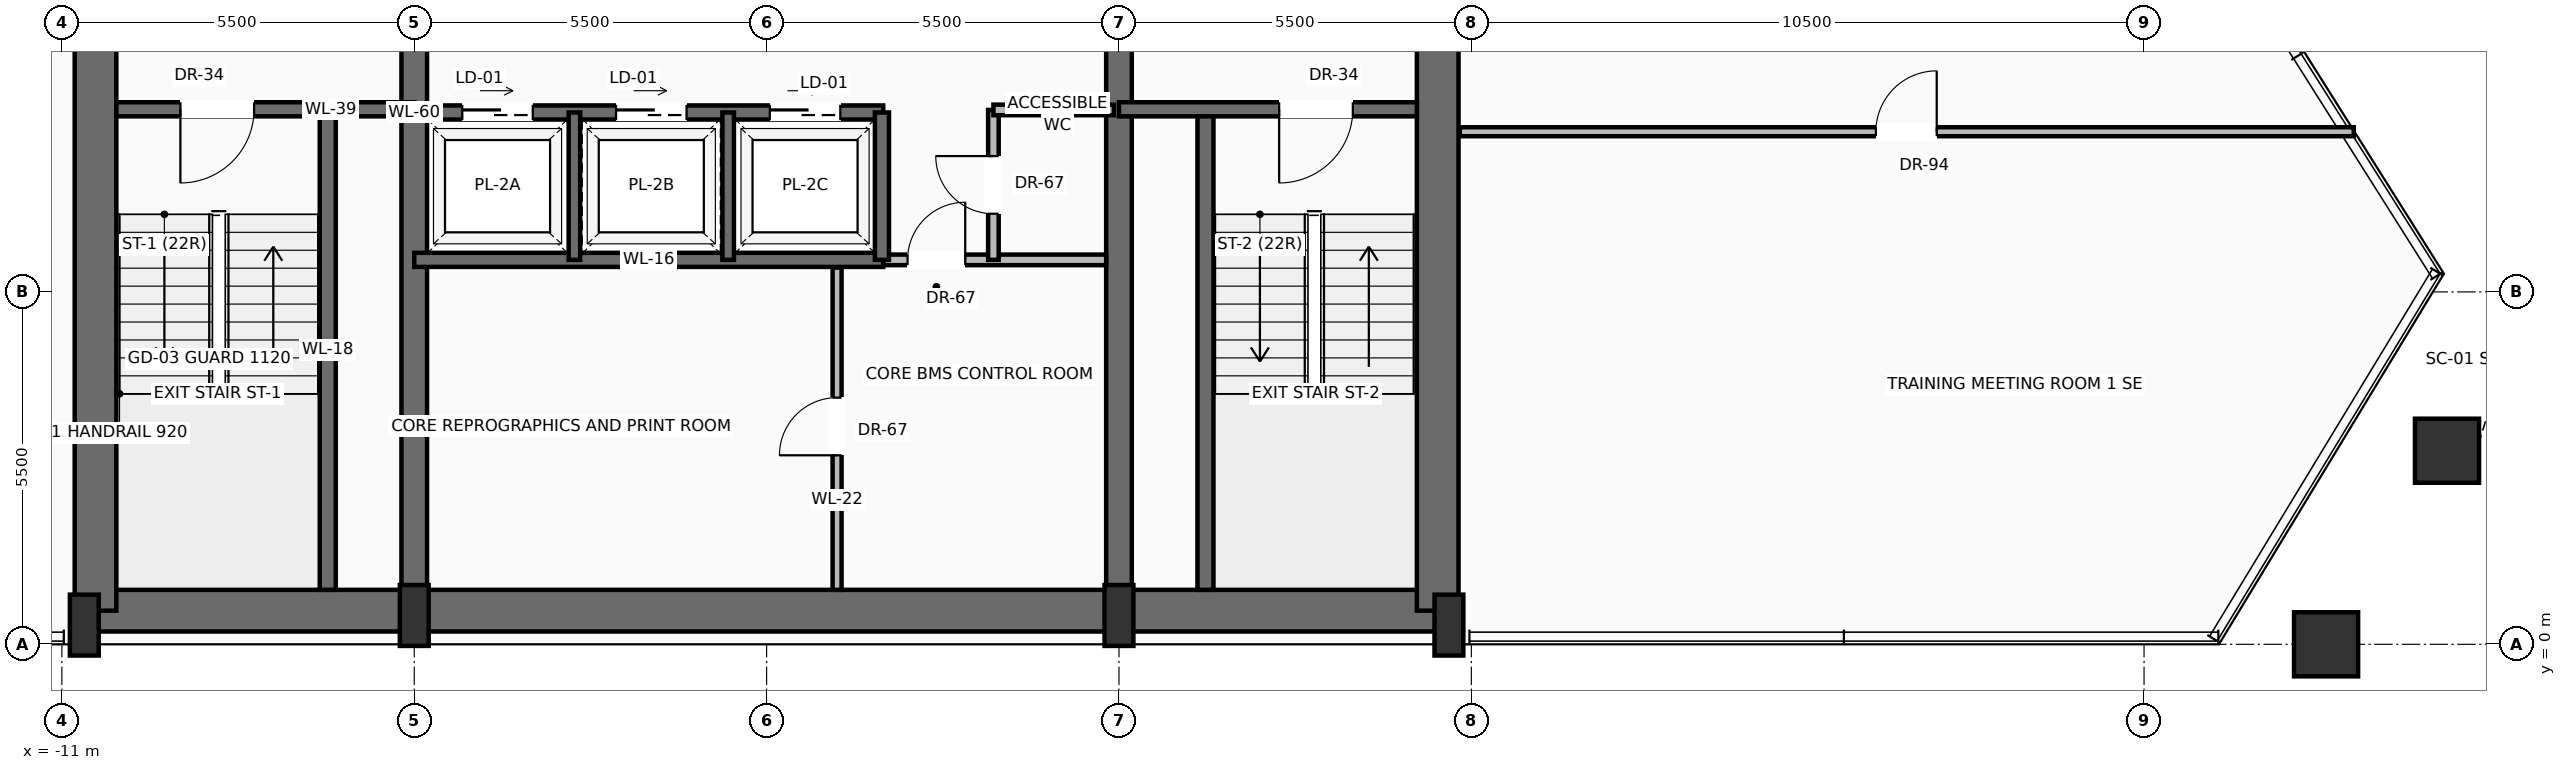
"""IFC4 building model, lengths in metres.
Left out: names, types, materials, properties, quantities, classifications, styles, units other than length and angle.
Written with IfcOpenShell. Run it as: python <this file> out.ifc"""

import sys

from ifc_helpers import new_model, si_unit, direction, frame, frame_2d, origin, origin_2d, place, context, subcontext, project, spatial, rectangle, hollow_rectangle, extrude, source, transform, mapped, element, fill, save


model = new_model("IFC4")
c1 = context("Model", 3, precision=1e-05, world=origin(), true_north=direction((0.0, 1.0)))
c2 = subcontext(c1, "Body", "Model", "MODEL_VIEW")
j1 = project(units=[si_unit("LENGTHUNIT", "METRE"), si_unit("PLANEANGLEUNIT", "RADIAN")], contexts=[c1])
p1 = place(None, origin())
s1 = spatial("IfcSite", under=j1, at=p1, CompositionType="ELEMENT")
p2 = place(p1, origin())
s2 = spatial("IfcBuilding", under=s1, at=p2, CompositionType="ELEMENT")
p3 = place(p2, frame((0.0, 0.0, 208.0)))
s3 = spatial("IfcBuildingStorey", under=s2, at=p3, CompositionType="ELEMENT", Elevation=208.0)
p4 = place(p3, frame((-10.65, 0.525, 0.0), z_axis=(0.0, 0.0, 1.0), x_axis=(1.0, 0.0, 0.0)))
e1 = element("IfcWall", 1, at=p4, inside=s3, PredefinedType="SHEAR", context=c2, shape_type="SweptSolid", body=[
    extrude(rectangle(XDim=21.3, YDim=0.65, at=frame_2d((10.65, 0.0))), origin(), (0.0, 0.0, 1.0), 3.47),
])
for number, where, z_axis, x_axis in (
    (2, (-10.475, 0.525, 0.0), (0.0, 0.0, 1.0), (0.0, 1.0, 0.0)),
    (3, (10.475, 0.525, 0.0), (0.0, 0.0, 1.0), (0.0, 1.0, 0.0)),
):
    element("IfcWall", number, at=place(p3, frame(where, z_axis=z_axis, x_axis=x_axis)), inside=s3, PredefinedType="SHEAR", context=c2, shape_type="SweptSolid", body=[
        extrude(rectangle(XDim=15.55, YDim=0.65, at=frame_2d((7.775, 0.0))), origin(), (0.0, 0.0, 1.0), 3.47),
    ])
p5 = place(p3, frame((-5.5, 0.525, 0.0), z_axis=(0.0, 0.0, 1.0), x_axis=(0.0, 1.0, 0.0)))
e4 = element("IfcWall", 4, at=p5, inside=s3, PredefinedType="SHEAR", context=c2, shape_type="SweptSolid", body=[
    extrude(rectangle(XDim=15.55, YDim=0.4, at=frame_2d((7.775, 0.0))), origin(), (0.0, 0.0, 1.0), 3.47),
])
p6 = place(p5, frame((8.975, 0.0, 0.0)))
e5 = element("IfcOpeningElement", 5, at=p6, cuts=e4, PredefinedType="OPENING", context=c2, shape_type="SweptSolid", body=[
    extrude(rectangle(XDim=1.1, YDim=2.2, at=frame_2d((0.55, 1.1))), frame((0.0, 0.21, 0.0), z_axis=(0.0, -1.0, 0.0), x_axis=(1.0, 0.0, 0.0)), (0.0, 0.0, 1.0), 0.42),
])
p7 = place(p3, frame((5.5, 0.525, 0.0), z_axis=(0.0, 0.0, 1.0), x_axis=(0.0, 1.0, 0.0)))
e6 = element("IfcWall", 6, at=p7, inside=s3, PredefinedType="SHEAR", context=c2, shape_type="SweptSolid", body=[
    extrude(rectangle(XDim=15.55, YDim=0.4, at=frame_2d((7.775, 0.0))), origin(), (0.0, 0.0, 1.0), 3.47),
])
p8 = place(p7, frame((8.975, 0.0, 0.0)))
e7 = element("IfcOpeningElement", 7, at=p8, cuts=e6, PredefinedType="OPENING", context=c2, shape_type="SweptSolid", body=[
    extrude(rectangle(XDim=1.1, YDim=2.2, at=frame_2d((0.55, 1.1))), frame((0.0, 0.21, 0.0), z_axis=(0.0, -1.0, 0.0), x_axis=(1.0, 0.0, 0.0)), (0.0, 0.0, 1.0), 0.42),
])
m1 = source(origin(), c2, "Body", "SweptSolid", [
    extrude(rectangle(XDim=0.45, YDim=0.95, at=origin_2d()), origin(), (0.0, 0.0, 1.0), 3.7),
])
for number, where, z_axis, x_axis in (
    (8, (-10.65, 0.3, 0.0), (0.0, 0.0, 1.0), (1.0, 0.0, 0.0)),
    (9, (-5.5, 0.45, 0.0), (0.0, 0.0, 1.0), (1.0, 0.0, 0.0)),
    (10, (5.5, 0.45, 0.0), (0.0, 0.0, 1.0), (1.0, 0.0, 0.0)),
    (11, (10.65, 0.3, 0.0), (0.0, 0.0, 1.0), (1.0, 0.0, 0.0)),
):
    element("IfcColumn", number, at=place(p3, frame(where, z_axis=z_axis, x_axis=x_axis)), inside=s3, PredefinedType="PILASTER", context=c2, shape_type="MappedRepresentation", body=[
        mapped(m1, transform((0.0, 0.0, 0.0), scale=1.0)),
    ])
m2 = source(origin(), c2, "Body", "SweptSolid", [
    extrude(hollow_rectangle(XDim=1.0, YDim=1.0, WallThickness=0.05, at=origin_2d()), origin(), (0.0, 0.0, 1.0), 3.691),
])
p9 = place(p3, frame((24.341, 0.0, 0.004), z_axis=(0.004365326486, 0.0, 0.999990471917), x_axis=(0.0, 1.0, 0.0)))
e12 = element("IfcColumn", 12, at=p9, inside=s3, PredefinedType="COLUMN", context=c2, shape_type="MappedRepresentation", body=[
    mapped(m2, transform((0.0, 0.0, 0.0), scale=1.0)),
])
m3 = source(origin(), c2, "Body", "SweptSolid", [
    extrude(hollow_rectangle(XDim=1.0, YDim=1.0, WallThickness=0.05, at=origin_2d()), origin(), (0.0, 0.0, 1.0), 3.692),
])
p10 = place(p3, frame((26.229, 3.021, 0.004), z_axis=(-0.00800175362, -0.017061590362, 0.99982242127), x_axis=(0.905374629778, -0.424613682958, 0.0)))
e13 = element("IfcColumn", 13, at=p10, inside=s3, PredefinedType="COLUMN", context=c2, shape_type="MappedRepresentation", body=[
    mapped(m3, transform((0.0, 0.0, 0.0), scale=1.0)),
])
p11 = place(p3, frame((-6.85, 0.85, 0.0), z_axis=(0.0, 0.0, 1.0), x_axis=(0.0, 1.0, 0.0)))
e14 = element("IfcWall", 14, at=p11, inside=s3, PredefinedType="SOLIDWALL", context=c2, shape_type="SweptSolid", body=[
    extrude(rectangle(XDim=7.5, YDim=0.25, at=frame_2d((3.75, 0.0))), origin(), (0.0, 0.0, 1.0), 3.47),
])
p12 = place(p3, frame((-5.5, 8.35, 0.0), z_axis=(0.0, 0.0, 1.0), x_axis=(-1.0, 0.0, 0.0)))
e15 = element("IfcWall", 15, at=p12, inside=s3, PredefinedType="SOLIDWALL", context=c2, shape_type="SweptSolid", body=[
    extrude(rectangle(XDim=4.65, YDim=0.22, at=frame_2d((2.325, 0.0))), origin(), (0.0, 0.0, 1.0), 3.47),
])
p13 = place(p12, frame((2.5, 0.0, 0.0)))
e16 = element("IfcOpeningElement", 16, at=p13, cuts=e15, PredefinedType="OPENING", context=c2, shape_type="SweptSolid", body=[
    extrude(rectangle(XDim=1.15, YDim=2.2, at=frame_2d((0.575, 1.1))), frame((0.0, 0.12, 0.0), z_axis=(0.0, -1.0, 0.0), x_axis=(1.0, 0.0, 0.0)), (0.0, 0.0, 1.0), 0.24),
])
p14 = place(p3, frame((6.85, 0.85, 0.0), z_axis=(0.0, 0.0, 1.0), x_axis=(0.0, 1.0, 0.0)))
e17 = element("IfcWall", 17, at=p14, inside=s3, PredefinedType="SOLIDWALL", context=c2, shape_type="SweptSolid", body=[
    extrude(rectangle(XDim=7.5, YDim=0.25, at=frame_2d((3.75, 0.0))), origin(), (0.0, 0.0, 1.0), 3.47),
])
p15 = place(p3, frame((10.15, 8.35, 0.0), z_axis=(0.0, 0.0, 1.0), x_axis=(-1.0, 0.0, 0.0)))
e18 = element("IfcWall", 18, at=p15, inside=s3, PredefinedType="SOLIDWALL", context=c2, shape_type="SweptSolid", body=[
    extrude(rectangle(XDim=4.65, YDim=0.22, at=frame_2d((2.325, 0.0))), origin(), (0.0, 0.0, 1.0), 3.47),
])
p16 = place(p15, frame((1.0, 0.0, 0.0)))
e19 = element("IfcOpeningElement", 19, at=p16, cuts=e18, PredefinedType="OPENING", context=c2, shape_type="SweptSolid", body=[
    extrude(rectangle(XDim=1.15, YDim=2.2, at=frame_2d((0.575, 1.1))), frame((0.0, 0.12, 0.0), z_axis=(0.0, -1.0, 0.0), x_axis=(1.0, 0.0, 0.0)), (0.0, 0.0, 1.0), 0.24),
])
p17 = place(p3, frame((1.82, 6.0, 0.0), z_axis=(0.0, 0.0, 1.0), x_axis=(1.0, 0.0, 0.0)))
e20 = element("IfcWall", 20, at=p17, inside=s3, PredefinedType="PARTITIONING", context=c2, shape_type="SweptSolid", body=[
    extrude(rectangle(XDim=3.48, YDim=0.165, at=frame_2d((1.74, 0.0))), origin(), (0.0, 0.0, 1.0), 3.462),
])
p18 = place(p17, frame((0.38, 0.0, 0.0)))
e21 = element("IfcOpeningElement", 21, at=p18, cuts=e20, PredefinedType="OPENING", context=c2, shape_type="SweptSolid", body=[
    extrude(rectangle(XDim=0.9, YDim=2.1, at=frame_2d((0.45, 1.05))), frame((0.0, 0.093, 0.0), z_axis=(0.0, -1.0, 0.0), x_axis=(1.0, 0.0, 0.0)), (0.0, 0.0, 1.0), 0.185),
])
p19 = place(p3, frame((1.1, 0.85, 0.0), z_axis=(0.0, 0.0, 1.0), x_axis=(0.0, 1.0, 0.0)))
e22 = element("IfcWall", 22, at=p19, inside=s3, PredefinedType="PARTITIONING", context=c2, shape_type="SweptSolid", body=[
    extrude(rectangle(XDim=5.03, YDim=0.14, at=frame_2d((2.515, 0.0))), origin(), (0.0, 0.0, 1.0), 3.462),
])
p20 = place(p19, frame((2.1, 0.0, 0.0)))
e23 = element("IfcOpeningElement", 23, at=p20, cuts=e22, PredefinedType="OPENING", context=c2, shape_type="SweptSolid", body=[
    extrude(rectangle(XDim=0.9, YDim=2.1, at=frame_2d((0.45, 1.05))), frame((0.0, 0.08, 0.0), z_axis=(0.0, -1.0, 0.0), x_axis=(1.0, 0.0, 0.0)), (0.0, 0.0, 1.0), 0.16),
])
p21 = place(p3, frame((3.54, 6.0, 0.0), z_axis=(0.0, 0.0, 1.0), x_axis=(0.0, 1.0, 0.0)))
e24 = element("IfcWall", 24, at=p21, inside=s3, PredefinedType="PARTITIONING", context=c2, shape_type="SweptSolid", body=[
    extrude(rectangle(XDim=2.34, YDim=0.165, at=frame_2d((1.17, 0.0))), origin(), (0.0, 0.0, 1.0), 3.462),
])
p22 = place(p21, frame((0.72, 0.0, 0.0)))
e25 = element("IfcOpeningElement", 25, at=p22, cuts=e24, PredefinedType="OPENING", context=c2, shape_type="SweptSolid", body=[
    extrude(rectangle(XDim=0.9, YDim=2.1, at=frame_2d((0.45, 1.05))), frame((0.0, 0.093, 0.0), z_axis=(0.0, -1.0, 0.0), x_axis=(1.0, 0.0, 0.0)), (0.0, 0.0, 1.0), 0.185),
])
p23 = place(p3, frame((3.54, 8.34, 0.0), z_axis=(0.0, 0.0, 1.0), x_axis=(1.0, 0.0, 0.0)))
e26 = element("IfcWall", 26, at=p23, inside=s3, PredefinedType="PARTITIONING", context=c2, shape_type="SweptSolid", body=[
    extrude(rectangle(XDim=1.88, YDim=0.165, at=frame_2d((0.94, 0.0))), origin(), (0.0, 0.0, 1.0), 3.462),
])
p24 = place(p3, frame((-5.5, 6.0, 0.0), z_axis=(0.0, 0.0, 1.0), x_axis=(1.0, 0.0, 0.0)))
e27 = element("IfcWall", 27, at=p24, inside=s3, PredefinedType="SOLIDWALL", context=c2, shape_type="SweptSolid", body=[
    extrude(rectangle(XDim=7.32, YDim=0.22, at=frame_2d((3.66, 0.0))), origin(), (0.0, 0.0, 1.0), 3.47),
])
p25 = place(p3, frame((-5.5, 8.3, 0.0), z_axis=(0.0, 0.0, 1.0), x_axis=(1.0, 0.0, 0.0)))
e28 = element("IfcWall", 28, at=p25, inside=s3, PredefinedType="SOLIDWALL", context=c2, shape_type="SweptSolid", body=[
    extrude(rectangle(XDim=7.32, YDim=0.22, at=frame_2d((3.66, 0.0))), origin(), (0.0, 0.0, 1.0), 3.47),
])
p26 = place(p25, frame((0.75, 0.0, 0.0)))
e29 = element("IfcOpeningElement", 29, at=p26, cuts=e28, PredefinedType="OPENING", context=c2, shape_type="SweptSolid", body=[
    extrude(rectangle(XDim=1.1, YDim=2.2, at=frame_2d((0.55, 1.1))), frame((0.0, 0.12, 0.0), z_axis=(0.0, -1.0, 0.0), x_axis=(1.0, 0.0, 0.0)), (0.0, 0.0, 1.0), 0.24),
])
p27 = place(p25, frame((3.15, 0.0, 0.0)))
e30 = element("IfcOpeningElement", 30, at=p27, cuts=e28, PredefinedType="OPENING", context=c2, shape_type="SweptSolid", body=[
    extrude(rectangle(XDim=1.1, YDim=2.2, at=frame_2d((0.55, 1.1))), frame((0.0, 0.12, 0.0), z_axis=(0.0, -1.0, 0.0), x_axis=(1.0, 0.0, 0.0)), (0.0, 0.0, 1.0), 0.24),
])
p28 = place(p25, frame((5.55, 0.0, 0.0)))
e31 = element("IfcOpeningElement", 31, at=p28, cuts=e28, PredefinedType="OPENING", context=c2, shape_type="SweptSolid", body=[
    extrude(rectangle(XDim=1.1, YDim=2.2, at=frame_2d((0.55, 1.1))), frame((0.0, 0.12, 0.0), z_axis=(0.0, -1.0, 0.0), x_axis=(1.0, 0.0, 0.0)), (0.0, 0.0, 1.0), 0.24),
])
p29 = place(p3, frame((1.8, 6.0, 0.0), z_axis=(0.0, 0.0, 1.0), x_axis=(0.0, 1.0, 0.0)))
e32 = element("IfcWall", 32, at=p29, inside=s3, PredefinedType="SOLIDWALL", context=c2, shape_type="SweptSolid", body=[
    extrude(rectangle(XDim=2.3, YDim=0.22, at=frame_2d((1.15, 0.0))), origin(), (0.0, 0.0, 1.0), 3.47),
])
for number, where, z_axis, x_axis in (
    (33, (-3.0, 6.0, 0.0), (0.0, 0.0, 1.0), (0.0, 1.0, 0.0)),
    (34, (-0.6, 6.0, 0.0), (0.0, 0.0, 1.0), (0.0, 1.0, 0.0)),
):
    element("IfcWall", number, at=place(p3, frame(where, z_axis=z_axis, x_axis=x_axis)), inside=s3, PredefinedType="SOLIDWALL", context=c2, shape_type="SweptSolid", body=[
        extrude(rectangle(XDim=2.3, YDim=0.18, at=frame_2d((1.15, 0.0))), origin(), (0.0, 0.0, 1.0), 3.47),
    ])
p30 = place(p3, frame((10.82, 8.0, 0.0), z_axis=(0.0, 0.0, 1.0), x_axis=(1.0, 0.0, 0.0)))
e35 = element("IfcWall", 35, at=p30, inside=s3, PredefinedType="PARTITIONING", context=c2, shape_type="SweptSolid", body=[
    extrude(rectangle(XDim=13.953, YDim=0.14, at=frame_2d((6.976, 0.0))), origin(), (0.0, 0.0, 1.0), 3.462),
])
p31 = place(p30, frame((6.494, 0.0, 0.0)))
e36 = element("IfcOpeningElement", 36, at=p31, cuts=e35, PredefinedType="OPENING", context=c2, shape_type="SweptSolid", body=[
    extrude(rectangle(XDim=0.95, YDim=2.2, at=frame_2d((0.475, 1.1))), frame((0.0, 0.08, 0.0), z_axis=(0.0, -1.0, 0.0), x_axis=(1.0, 0.0, 0.0)), (0.0, 0.0, 1.0), 0.16),
])
m4 = source(origin(), c2, "Body", "SweptSolid", [
    extrude(rectangle(XDim=1.15, YDim=2.2, at=frame_2d((0.575, 1.1))), frame((0.0, 0.025, 0.0), z_axis=(0.0, -1.0, 0.0), x_axis=(1.0, 0.0, 0.0)), (0.0, 0.0, 1.0), 0.05),
])
p32 = place(p13, origin())
e37 = element("IfcDoor", 37, at=p32, inside=s3, OperationType="SINGLE_SWING_RIGHT", PredefinedType="DOOR", context=c2, shape_type="MappedRepresentation", body=[
    mapped(m4, transform((0.0, 0.0, 0.0), scale=1.0)),
])
fill(e16, e37)
p33 = place(p16, origin())
e38 = element("IfcDoor", 38, at=p33, inside=s3, OperationType="SINGLE_SWING_RIGHT", PredefinedType="DOOR", context=c2, shape_type="MappedRepresentation", body=[
    mapped(m4, transform((0.0, 0.0, 0.0), scale=1.0)),
])
fill(e19, e38)
m5 = source(origin(), c2, "Body", "SweptSolid", [
    extrude(rectangle(XDim=0.9, YDim=2.1, at=frame_2d((0.45, 1.05))), frame((0.0, 0.025, 0.0), z_axis=(0.0, -1.0, 0.0), x_axis=(1.0, 0.0, 0.0)), (0.0, 0.0, 1.0), 0.05),
])
p34 = place(p18, origin())
e39 = element("IfcDoor", 39, at=p34, inside=s3, OperationType="SINGLE_SWING_RIGHT", PredefinedType="DOOR", context=c2, shape_type="MappedRepresentation", body=[
    mapped(m5, transform((0.0, 0.0, 0.0), scale=1.0)),
])
fill(e21, e39)
p35 = place(p20, origin())
e40 = element("IfcDoor", 40, at=p35, inside=s3, OperationType="SINGLE_SWING_LEFT", PredefinedType="DOOR", context=c2, shape_type="MappedRepresentation", body=[
    mapped(m5, transform((0.0, 0.0, 0.0), scale=1.0)),
])
fill(e23, e40)
p36 = place(p22, origin())
e41 = element("IfcDoor", 41, at=p36, inside=s3, OperationType="SINGLE_SWING_RIGHT", PredefinedType="DOOR", context=c2, shape_type="MappedRepresentation", body=[
    mapped(m5, transform((0.0, 0.0, 0.0), scale=1.0)),
])
fill(e25, e41)
m6 = source(origin(), c2, "Body", "SweptSolid", [
    extrude(rectangle(XDim=1.1, YDim=2.2, at=frame_2d((0.55, 1.1))), frame((0.0, 0.025, 0.0), z_axis=(0.0, -1.0, 0.0), x_axis=(1.0, 0.0, 0.0)), (0.0, 0.0, 1.0), 0.05),
])
p37 = place(p26, origin())
e42 = element("IfcDoor", 42, at=p37, inside=s3, OperationType="SLIDING_TO_LEFT", PredefinedType="DOOR", context=c2, shape_type="MappedRepresentation", body=[
    mapped(m6, transform((0.0, 0.0, 0.0), scale=1.0)),
])
fill(e29, e42)
p38 = place(p27, origin())
e43 = element("IfcDoor", 43, at=p38, inside=s3, OperationType="SLIDING_TO_LEFT", PredefinedType="DOOR", context=c2, shape_type="MappedRepresentation", body=[
    mapped(m6, transform((0.0, 0.0, 0.0), scale=1.0)),
])
fill(e30, e43)
p39 = place(p28, origin())
e44 = element("IfcDoor", 44, at=p39, inside=s3, OperationType="SLIDING_TO_LEFT", PredefinedType="DOOR", context=c2, shape_type="MappedRepresentation", body=[
    mapped(m6, transform((0.0, 0.0, 0.0), scale=1.0)),
])
fill(e31, e44)
m7 = source(origin(), c2, "Body", "SweptSolid", [
    extrude(rectangle(XDim=0.95, YDim=2.2, at=frame_2d((0.475, 1.1))), frame((0.0, 0.025, 0.0), z_axis=(0.0, -1.0, 0.0), x_axis=(1.0, 0.0, 0.0)), (0.0, 0.0, 1.0), 0.05),
])
p40 = place(p31, origin())
e45 = element("IfcDoor", 45, at=p40, inside=s3, OperationType="SINGLE_SWING_RIGHT", PredefinedType="DOOR", context=c2, shape_type="MappedRepresentation", body=[
    mapped(m7, transform((0.0, 0.0, 0.0), scale=1.0)),
])
fill(e36, e45)
save(model, sys.argv[1])
